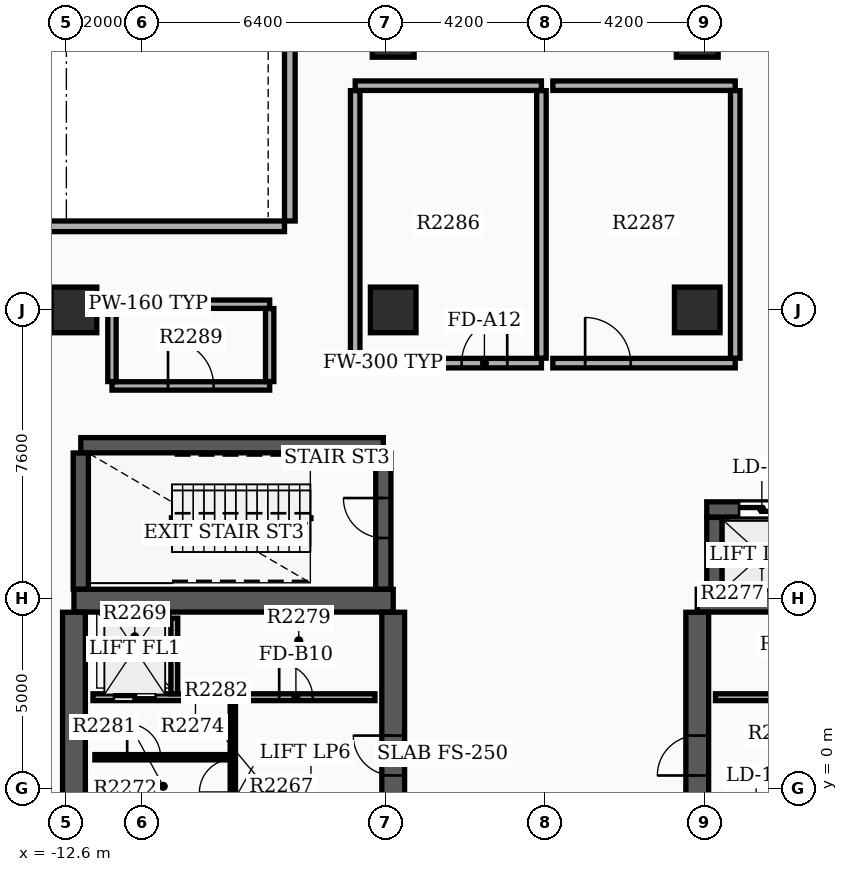
"""IFC4 building model, lengths in metres.
Left out: names, types, materials, properties, quantities, classifications, styles, units other than length and angle.
Written with IfcOpenShell. Run it as: python <this file> out.ifc"""

import sys

from ifc_helpers import new_model, si_unit, direction, frame, frame_2d, origin, origin_2d, place, context, subcontext, project, spatial, rectangle, extrude, element, fill, save


model = new_model("IFC4")
c1 = context("Model", 3, precision=1e-05, world=origin(), true_north=direction((0.0, 1.0)))
c2 = subcontext(c1, "Body", "Model", "MODEL_VIEW")
j1 = project(units=[si_unit("LENGTHUNIT", "METRE"), si_unit("PLANEANGLEUNIT", "RADIAN")], contexts=[c1])
p1 = place(None, origin())
s1 = spatial("IfcSite", under=j1, at=p1, CompositionType="ELEMENT")
p2 = place(p1, origin())
s2 = spatial("IfcBuilding", under=s1, at=p2, CompositionType="ELEMENT")
p3 = place(p2, frame((0.0, 0.0, 143.7)))
s3 = spatial("IfcBuildingStorey", under=s2, at=p3, CompositionType="ELEMENT", Elevation=143.7)
p4 = place(p3, frame((-12.4, 4.95, 0.0), z_axis=(0.0, 0.0, 1.0), x_axis=(1.0, 0.0, 0.0)))
e1 = element("IfcWall", 1, at=p4, inside=s3, PredefinedType="SHEAR", context=c2, shape_type="SweptSolid", body=[
    extrude(rectangle(XDim=8.4, YDim=0.6, at=frame_2d((4.2, 0.0))), origin(), (0.0, 0.0, 1.0), 4.9),
])
p5 = place(p3, frame((-12.4, -6.545, 0.0), z_axis=(0.0, 0.0, 1.0), x_axis=(0.0, 1.0, 0.0)))
e2 = element("IfcWall", 2, at=p5, inside=s3, PredefinedType="SHEAR", context=c2, shape_type="SweptSolid", body=[
    extrude(rectangle(XDim=11.19, YDim=0.6, at=frame_2d((5.595, 0.0))), origin(), (0.0, 0.0, 1.0), 4.9),
])
p6 = place(p3, frame((-4.0, -6.545, 0.0), z_axis=(0.0, 0.0, 1.0), x_axis=(0.0, 1.0, 0.0)))
e3 = element("IfcWall", 3, at=p6, inside=s3, PredefinedType="SHEAR", context=c2, shape_type="SweptSolid", body=[
    extrude(rectangle(XDim=11.19, YDim=0.6, at=frame_2d((5.595, 0.0))), origin(), (0.0, 0.0, 1.0), 4.9),
])
p7 = place(p6, frame((1.295, 0.0, 0.0)))
e4 = element("IfcOpeningElement", 4, at=p7, cuts=e3, PredefinedType="OPENING", context=c2, shape_type="SweptSolid", body=[
    extrude(rectangle(XDim=1.05, YDim=2.15, at=frame_2d((0.525, 1.075))), frame((0.0, 0.31, 0.0), z_axis=(0.0, -1.0, 0.0), x_axis=(1.0, 0.0, 0.0)), (0.0, 0.0, 1.0), 0.62),
])
p8 = place(p6, frame((6.895, 0.0, 0.0)))
e5 = element("IfcOpeningElement", 5, at=p8, cuts=e3, PredefinedType="OPENING", context=c2, shape_type="SweptSolid", body=[
    extrude(rectangle(XDim=1.05, YDim=2.15, at=frame_2d((0.525, 1.075))), frame((0.0, 0.31, 0.0), z_axis=(0.0, -1.0, 0.0), x_axis=(1.0, 0.0, 0.0)), (0.0, 0.0, 1.0), 0.62),
])
p9 = place(p3, frame((4.0, 4.95, 0.0), z_axis=(0.0, 0.0, 1.0), x_axis=(1.0, 0.0, 0.0)))
e6 = element("IfcWall", 6, at=p9, inside=s3, PredefinedType="SHEAR", context=c2, shape_type="SweptSolid", body=[
    extrude(rectangle(XDim=8.4, YDim=0.6, at=frame_2d((4.2, 0.0))), origin(), (0.0, 0.0, 1.0), 4.9),
])
p10 = place(p3, frame((4.0, -6.545, 0.0), z_axis=(0.0, 0.0, 1.0), x_axis=(0.0, 1.0, 0.0)))
e7 = element("IfcWall", 7, at=p10, inside=s3, PredefinedType="SHEAR", context=c2, shape_type="SweptSolid", body=[
    extrude(rectangle(XDim=11.19, YDim=0.6, at=frame_2d((5.595, 0.0))), origin(), (0.0, 0.0, 1.0), 4.9),
])
p11 = place(p10, frame((1.295, 0.0, 0.0)))
e8 = element("IfcOpeningElement", 8, at=p11, cuts=e7, PredefinedType="OPENING", context=c2, shape_type="SweptSolid", body=[
    extrude(rectangle(XDim=1.05, YDim=2.15, at=frame_2d((0.525, 1.075))), frame((0.0, 0.31, 0.0), z_axis=(0.0, -1.0, 0.0), x_axis=(1.0, 0.0, 0.0)), (0.0, 0.0, 1.0), 0.62),
])
p12 = place(p10, frame((6.895, 0.0, 0.0)))
e9 = element("IfcOpeningElement", 9, at=p12, cuts=e7, PredefinedType="OPENING", context=c2, shape_type="SweptSolid", body=[
    extrude(rectangle(XDim=1.05, YDim=2.15, at=frame_2d((0.525, 1.075))), frame((0.0, 0.31, 0.0), z_axis=(0.0, -1.0, 0.0), x_axis=(1.0, 0.0, 0.0)), (0.0, 0.0, 1.0), 0.62),
])
p13 = place(p3, frame((-12.22, 9.04, 0.0), z_axis=(0.0, 0.0, 1.0), x_axis=(1.0, 0.0, 0.0)))
e10 = element("IfcWall", 10, at=p13, inside=s3, PredefinedType="SHEAR", context=c2, shape_type="SweptSolid", body=[
    extrude(rectangle(XDim=7.96, YDim=0.4, at=frame_2d((3.98, 0.0))), origin(), (0.0, 0.0, 1.0), 4.9),
])
p14 = place(p3, frame((-12.22, 5.255, 0.0), z_axis=(0.0, 0.0, 1.0), x_axis=(0.0, 1.0, 0.0)))
e11 = element("IfcWall", 11, at=p14, inside=s3, PredefinedType="SHEAR", context=c2, shape_type="SweptSolid", body=[
    extrude(rectangle(XDim=3.58, YDim=0.4, at=frame_2d((1.79, 0.0))), origin(), (0.0, 0.0, 1.0), 4.9),
])
p15 = place(p3, frame((-4.26, 5.255, 0.0), z_axis=(0.0, 0.0, 1.0), x_axis=(0.0, 1.0, 0.0)))
e12 = element("IfcWall", 12, at=p15, inside=s3, PredefinedType="SHEAR", context=c2, shape_type="SweptSolid", body=[
    extrude(rectangle(XDim=3.58, YDim=0.4, at=frame_2d((1.79, 0.0))), origin(), (0.0, 0.0, 1.0), 4.9),
])
p16 = place(p15, frame((1.345, 0.0, 0.0)))
e13 = element("IfcOpeningElement", 13, at=p16, cuts=e12, PredefinedType="OPENING", context=c2, shape_type="SweptSolid", body=[
    extrude(rectangle(XDim=1.05, YDim=2.15, at=frame_2d((0.525, 1.075))), frame((0.0, 0.21, 0.0), z_axis=(0.0, -1.0, 0.0), x_axis=(1.0, 0.0, 0.0)), (0.0, 0.0, 1.0), 0.42),
])
p17 = place(p3, frame((4.45, 5.255, 0.0), z_axis=(0.0, 0.0, 1.0), x_axis=(0.0, 1.0, 0.0)))
e14 = element("IfcWall", 14, at=p17, inside=s3, PredefinedType="SHEAR", context=c2, shape_type="SweptSolid", body=[
    extrude(rectangle(XDim=1.885, YDim=0.4, at=frame_2d((0.942, 0.0))), origin(), (0.0, 0.0, 1.0), 4.9),
])
p18 = place(p3, frame((4.25, 7.35, 0.0), z_axis=(0.0, 0.0, 1.0), x_axis=(1.0, 0.0, 0.0)))
e15 = element("IfcWall", 15, at=p18, inside=s3, PredefinedType="SHEAR", context=c2, shape_type="SweptSolid", body=[
    extrude(rectangle(XDim=5.4, YDim=0.4, at=frame_2d((2.7, 0.0))), origin(), (0.0, 0.0, 1.0), 4.9),
])
p19 = place(p18, frame((0.85, 0.0, 0.0)))
e16 = element("IfcOpeningElement", 16, at=p19, cuts=e15, PredefinedType="OPENING", context=c2, shape_type="SweptSolid", body=[
    extrude(rectangle(XDim=1.2, YDim=2.2, at=frame_2d((0.6, 1.1))), frame((0.0, 0.21, 0.0), z_axis=(0.0, -1.0, 0.0), x_axis=(1.0, 0.0, 0.0)), (0.0, 0.0, 1.0), 0.42),
])
p20 = place(p18, frame((3.25, 0.0, 0.0)))
e17 = element("IfcOpeningElement", 17, at=p20, cuts=e15, PredefinedType="OPENING", context=c2, shape_type="SweptSolid", body=[
    extrude(rectangle(XDim=1.2, YDim=2.2, at=frame_2d((0.6, 1.1))), frame((0.0, 0.21, 0.0), z_axis=(0.0, -1.0, 0.0), x_axis=(1.0, 0.0, 0.0)), (0.0, 0.0, 1.0), 0.42),
])
for number, where, z_axis, x_axis in (
    (18, (-12.4, 12.6, 0.0), (0.0, 0.0, 1.0), (1.0, 0.0, 0.0)),
    (19, (4.0, 12.6, 0.0), (0.0, 0.0, 1.0), (1.0, 0.0, 0.0)),
    (20, (-4.0, 12.6, 0.0), (0.0, 0.0, 1.0), (1.0, 0.0, 0.0)),
):
    element("IfcColumn", number, at=place(p3, frame(where, z_axis=z_axis, x_axis=x_axis)), inside=s3, PredefinedType="COLUMN", context=c2, shape_type="SweptSolid", body=[
        extrude(rectangle(XDim=1.2, YDim=1.2, at=origin_2d()), origin(), (0.0, 0.0, 1.0), 5.1),
    ])
for number, where, z_axis, x_axis in (
    (21, (-4.0, 19.8, 0.0), (0.0, 0.0, 1.0), (1.0, 0.0, 0.0)),
    (22, (4.0, 19.8, 0.0), (0.0, 0.0, 1.0), (1.0, 0.0, 0.0)),
):
    element("IfcColumn", number, at=place(p3, frame(where, z_axis=z_axis, x_axis=x_axis)), inside=s3, PredefinedType="COLUMN", context=c2, shape_type="SweptSolid", body=[
        extrude(rectangle(XDim=1.1, YDim=1.1, at=origin_2d()), origin(), (0.0, 0.0, 1.0), 5.1),
    ])
p21 = place(p3, frame((-6.72, 35.04, 0.0), z_axis=(0.0, 0.0, 1.0), x_axis=(0.0, -1.0, 0.0)))
e23 = element("IfcWall", 23, at=p21, inside=s3, PredefinedType="STANDARD", context=c2, shape_type="SweptSolid", body=[
    extrude(rectangle(XDim=20.1, YDim=0.28, at=frame_2d((10.05, 0.0))), origin(), (0.0, 0.0, 1.0), 3.98),
])
p22 = place(p21, frame((0.85, 0.0, 0.95)))
e24 = element("IfcOpeningElement", 24, at=p22, cuts=e23, PredefinedType="OPENING", context=c2, shape_type="SweptSolid", body=[
    extrude(rectangle(XDim=1.1, YDim=1.2, at=frame_2d((0.55, 0.6))), frame((0.0, 0.15, 0.0), z_axis=(0.0, -1.0, 0.0), x_axis=(1.0, 0.0, 0.0)), (0.0, 0.0, 1.0), 0.3),
])
p23 = place(p3, frame((-13.16, 14.8, 0.0), z_axis=(0.0, 0.0, 1.0), x_axis=(1.0, 0.0, 0.0)))
e25 = element("IfcWall", 25, at=p23, inside=s3, PredefinedType="STANDARD", context=c2, shape_type="SweptSolid", body=[
    extrude(rectangle(XDim=6.3, YDim=0.28, at=frame_2d((3.15, 0.0))), origin(), (0.0, 0.0, 1.0), 3.98),
])
p24 = place(p3, frame((-11.9, 2.41, 0.0), z_axis=(0.0, 0.0, 1.0), x_axis=(1.0, 0.0, 0.0)))
e26 = element("IfcWall", 26, at=p24, inside=s3, PredefinedType="SOLIDWALL", context=c2, shape_type="SweptSolid", body=[
    extrude(rectangle(XDim=7.42, YDim=0.18, at=frame_2d((3.71, 0.0))), origin(), (0.0, 0.0, 1.0), 3.97),
])
p25 = place(p24, frame((0.55, 0.0, 0.0)))
e27 = element("IfcOpeningElement", 27, at=p25, cuts=e26, PredefinedType="OPENING", context=c2, shape_type="SweptSolid", body=[
    extrude(rectangle(XDim=1.1, YDim=2.15, at=frame_2d((0.55, 1.075))), frame((0.0, 0.1, 0.0), z_axis=(0.0, -1.0, 0.0), x_axis=(1.0, 0.0, 0.0)), (0.0, 0.0, 1.0), 0.2),
])
p26 = place(p24, frame((4.9, 0.0, 0.0)))
e28 = element("IfcOpeningElement", 28, at=p26, cuts=e26, PredefinedType="OPENING", context=c2, shape_type="SweptSolid", body=[
    extrude(rectangle(XDim=0.88, YDim=2.1, at=frame_2d((0.44, 1.05))), frame((0.0, 0.1, 0.0), z_axis=(0.0, -1.0, 0.0), x_axis=(1.0, 0.0, 0.0)), (0.0, 0.0, 1.0), 0.2),
])
p27 = place(p3, frame((4.48, 2.41, 0.0), z_axis=(0.0, 0.0, 1.0), x_axis=(1.0, 0.0, 0.0)))
e29 = element("IfcWall", 29, at=p27, inside=s3, PredefinedType="SOLIDWALL", context=c2, shape_type="SweptSolid", body=[
    extrude(rectangle(XDim=7.42, YDim=0.18, at=frame_2d((3.71, 0.0))), origin(), (0.0, 0.0, 1.0), 3.97),
])
p28 = place(p27, frame((5.67, 0.0, 0.0)))
e30 = element("IfcOpeningElement", 30, at=p28, cuts=e29, PredefinedType="OPENING", context=c2, shape_type="SweptSolid", body=[
    extrude(rectangle(XDim=1.1, YDim=2.15, at=frame_2d((0.55, 1.075))), frame((0.0, 0.1, 0.0), z_axis=(0.0, -1.0, 0.0), x_axis=(1.0, 0.0, 0.0)), (0.0, 0.0, 1.0), 0.2),
])
p29 = place(p27, frame((1.6, 0.0, 0.0)))
e31 = element("IfcOpeningElement", 31, at=p29, cuts=e29, PredefinedType="OPENING", context=c2, shape_type="SweptSolid", body=[
    extrude(rectangle(XDim=0.88, YDim=2.1, at=frame_2d((0.44, 1.05))), frame((0.0, 0.1, 0.0), z_axis=(0.0, -1.0, 0.0), x_axis=(1.0, 0.0, 0.0)), (0.0, 0.0, 1.0), 0.2),
])
p30 = place(p3, frame((-9.76, 2.5, 0.0), z_axis=(0.0, 0.0, 1.0), x_axis=(0.0, 1.0, 0.0)))
e32 = element("IfcWall", 32, at=p30, inside=s3, PredefinedType="SOLIDWALL", context=c2, shape_type="SweptSolid", body=[
    extrude(rectangle(XDim=1.99, YDim=0.18, at=frame_2d((0.995, 0.0))), origin(), (0.0, 0.0, 1.0), 3.97),
])
p31 = place(p3, frame((-8.22, -0.65, 0.0), z_axis=(0.0, 0.0, 1.0), x_axis=(0.0, 1.0, 0.0)))
e33 = element("IfcWall", 33, at=p31, inside=s3, PredefinedType="SOLIDWALL", context=c2, shape_type="SweptSolid", body=[
    extrude(rectangle(XDim=2.96, YDim=0.14, at=frame_2d((1.48, 0.0))), origin(), (0.0, 0.0, 1.0), 3.97),
])
p32 = place(p31, frame((0.55, 0.0, 0.0)))
e34 = element("IfcOpeningElement", 34, at=p32, cuts=e33, PredefinedType="OPENING", context=c2, shape_type="SweptSolid", body=[
    extrude(rectangle(XDim=0.88, YDim=2.1, at=frame_2d((0.44, 1.05))), frame((0.0, 0.08, 0.0), z_axis=(0.0, -1.0, 0.0), x_axis=(1.0, 0.0, 0.0)), (0.0, 0.0, 1.0), 0.16),
])
p33 = place(p3, frame((-11.85, 0.83, 0.0), z_axis=(0.0, 0.0, 1.0), x_axis=(1.0, 0.0, 0.0)))
e35 = element("IfcWall", 35, at=p33, inside=s3, PredefinedType="PARTITIONING", context=c2, shape_type="SweptSolid", body=[
    extrude(rectangle(XDim=3.552, YDim=0.14, at=frame_2d((1.776, 0.0))), origin(), (0.0, 0.0, 1.0), 3.97),
])
p34 = place(p33, frame((0.85, 0.0, 0.0)))
e36 = element("IfcOpeningElement", 36, at=p34, cuts=e35, PredefinedType="OPENING", context=c2, shape_type="SweptSolid", body=[
    extrude(rectangle(XDim=0.88, YDim=2.1, at=frame_2d((0.44, 1.05))), frame((0.0, 0.08, 0.0), z_axis=(0.0, -1.0, 0.0), x_axis=(1.0, 0.0, 0.0)), (0.0, 0.0, 1.0), 0.16),
])
p35 = place(p3, frame((-5.0, 11.2, 0.0), z_axis=(0.0, 0.0, 1.0), x_axis=(1.0, 0.0, 0.0)))
e37 = element("IfcWall", 37, at=p35, inside=s3, PredefinedType="SOLIDWALL", context=c2, shape_type="SweptSolid", body=[
    extrude(rectangle(XDim=4.9, YDim=0.25, at=frame_2d((2.45, 0.0))), origin(), (0.0, 0.0, 1.0), 3.97),
])
p36 = place(p35, frame((2.8, 0.0, 0.0)))
e38 = element("IfcOpeningElement", 38, at=p36, cuts=e37, PredefinedType="OPENING", context=c2, shape_type="SweptSolid", body=[
    extrude(rectangle(XDim=1.2, YDim=2.15, at=frame_2d((0.6, 1.075))), frame((0.0, 0.135, 0.0), z_axis=(0.0, -1.0, 0.0), x_axis=(1.0, 0.0, 0.0)), (0.0, 0.0, 1.0), 0.27),
])
p37 = place(p3, frame((-5.0, 18.5, 0.0), z_axis=(0.0, 0.0, 1.0), x_axis=(1.0, 0.0, 0.0)))
e39 = element("IfcWall", 39, at=p37, inside=s3, PredefinedType="SOLIDWALL", context=c2, shape_type="SweptSolid", body=[
    extrude(rectangle(XDim=4.9, YDim=0.25, at=frame_2d((2.45, 0.0))), origin(), (0.0, 0.0, 1.0), 3.97),
])
for number, where, z_axis, x_axis in (
    (40, (-5.0, 11.33, 0.0), (0.0, 0.0, 1.0), (0.0, 1.0, 0.0)),
    (41, (-0.1, 11.33, 0.0), (0.0, 0.0, 1.0), (0.0, 1.0, 0.0)),
):
    element("IfcWall", number, at=place(p3, frame(where, z_axis=z_axis, x_axis=x_axis)), inside=s3, PredefinedType="SOLIDWALL", context=c2, shape_type="SweptSolid", body=[
        extrude(rectangle(XDim=7.04, YDim=0.25, at=frame_2d((3.52, 0.0))), origin(), (0.0, 0.0, 1.0), 3.97),
    ])
p38 = place(p3, frame((0.2, 11.2, 0.0), z_axis=(0.0, 0.0, 1.0), x_axis=(1.0, 0.0, 0.0)))
e42 = element("IfcWall", 42, at=p38, inside=s3, PredefinedType="SOLIDWALL", context=c2, shape_type="SweptSolid", body=[
    extrude(rectangle(XDim=4.8, YDim=0.25, at=frame_2d((2.4, 0.0))), origin(), (0.0, 0.0, 1.0), 3.97),
])
p39 = place(p38, frame((0.85, 0.0, 0.0)))
e43 = element("IfcOpeningElement", 43, at=p39, cuts=e42, PredefinedType="OPENING", context=c2, shape_type="SweptSolid", body=[
    extrude(rectangle(XDim=1.2, YDim=2.15, at=frame_2d((0.6, 1.075))), frame((0.0, 0.135, 0.0), z_axis=(0.0, -1.0, 0.0), x_axis=(1.0, 0.0, 0.0)), (0.0, 0.0, 1.0), 0.27),
])
p40 = place(p3, frame((0.2, 18.5, 0.0), z_axis=(0.0, 0.0, 1.0), x_axis=(1.0, 0.0, 0.0)))
e44 = element("IfcWall", 44, at=p40, inside=s3, PredefinedType="SOLIDWALL", context=c2, shape_type="SweptSolid", body=[
    extrude(rectangle(XDim=4.8, YDim=0.25, at=frame_2d((2.4, 0.0))), origin(), (0.0, 0.0, 1.0), 3.97),
])
p41 = place(p3, frame((5.0, 11.33, 0.0), z_axis=(0.0, 0.0, 1.0), x_axis=(0.0, 1.0, 0.0)))
e45 = element("IfcWall", 45, at=p41, inside=s3, PredefinedType="SOLIDWALL", context=c2, shape_type="SweptSolid", body=[
    extrude(rectangle(XDim=7.04, YDim=0.25, at=frame_2d((3.52, 0.0))), origin(), (0.0, 0.0, 1.0), 3.97),
])
p42 = place(p3, frame((-11.4, 10.6, 0.0), z_axis=(0.0, 0.0, 1.0), x_axis=(1.0, 0.0, 0.0)))
e46 = element("IfcWall", 46, at=p42, inside=s3, PredefinedType="PARTITIONING", context=c2, shape_type="SweptSolid", body=[
    extrude(rectangle(XDim=4.15, YDim=0.22, at=frame_2d((2.075, 0.0))), origin(), (0.0, 0.0, 1.0), 3.97),
])
p43 = place(p42, frame((1.475, 0.0, 0.0)))
e47 = element("IfcOpeningElement", 47, at=p43, cuts=e46, PredefinedType="OPENING", context=c2, shape_type="SweptSolid", body=[
    extrude(rectangle(XDim=1.2, YDim=2.15, at=frame_2d((0.6, 1.075))), frame((0.0, 0.12, 0.0), z_axis=(0.0, -1.0, 0.0), x_axis=(1.0, 0.0, 0.0)), (0.0, 0.0, 1.0), 0.24),
])
p44 = place(p3, frame((-11.4, 12.75, 0.0), z_axis=(0.0, 0.0, 1.0), x_axis=(1.0, 0.0, 0.0)))
e48 = element("IfcWall", 48, at=p44, inside=s3, PredefinedType="PARTITIONING", context=c2, shape_type="SweptSolid", body=[
    extrude(rectangle(XDim=4.15, YDim=0.22, at=frame_2d((2.075, 0.0))), origin(), (0.0, 0.0, 1.0), 3.97),
])
for number, where, z_axis, x_axis in (
    (49, (-11.4, 10.715, 0.0), (0.0, 0.0, 1.0), (0.0, 1.0, 0.0)),
    (50, (-7.25, 10.715, 0.0), (0.0, 0.0, 1.0), (0.0, 1.0, 0.0)),
):
    element("IfcWall", number, at=place(p3, frame(where, z_axis=z_axis, x_axis=x_axis)), inside=s3, PredefinedType="PARTITIONING", context=c2, shape_type="SweptSolid", body=[
        extrude(rectangle(XDim=1.92, YDim=0.22, at=frame_2d((0.96, 0.0))), origin(), (0.0, 0.0, 1.0), 3.97),
    ])
p45 = place(p8, origin())
e51 = element("IfcDoor", 51, at=p45, inside=s3, OperationType="SINGLE_SWING_RIGHT", PredefinedType="DOOR", context=c2, shape_type="SweptSolid", body=[
    extrude(rectangle(XDim=1.05, YDim=2.15, at=frame_2d((0.525, 1.075))), frame((0.0, 0.025, 0.0), z_axis=(0.0, -1.0, 0.0), x_axis=(1.0, 0.0, 0.0)), (0.0, 0.0, 1.0), 0.05),
])
fill(e5, e51)
p46 = place(p12, origin())
e52 = element("IfcDoor", 52, at=p46, inside=s3, OperationType="SINGLE_SWING_LEFT", PredefinedType="DOOR", context=c2, shape_type="SweptSolid", body=[
    extrude(rectangle(XDim=1.05, YDim=2.15, at=frame_2d((0.525, 1.075))), frame((0.0, 0.025, 0.0), z_axis=(0.0, -1.0, 0.0), x_axis=(1.0, 0.0, 0.0)), (0.0, 0.0, 1.0), 0.05),
])
fill(e9, e52)
p47 = place(p16, origin())
e53 = element("IfcDoor", 53, at=p47, inside=s3, OperationType="SINGLE_SWING_RIGHT", PredefinedType="DOOR", context=c2, shape_type="SweptSolid", body=[
    extrude(rectangle(XDim=1.05, YDim=2.15, at=frame_2d((0.525, 1.075))), frame((0.0, 0.025, 0.0), z_axis=(0.0, -1.0, 0.0), x_axis=(1.0, 0.0, 0.0)), (0.0, 0.0, 1.0), 0.05),
])
fill(e13, e53)
p48 = place(p25, origin())
e54 = element("IfcDoor", 54, at=p48, inside=s3, OperationType="DOUBLE_DOOR_SLIDING", PredefinedType="DOOR", context=c2, shape_type="SweptSolid", body=[
    extrude(rectangle(XDim=1.1, YDim=2.15, at=frame_2d((0.55, 1.075))), frame((0.0, 0.025, 0.0), z_axis=(0.0, -1.0, 0.0), x_axis=(1.0, 0.0, 0.0)), (0.0, 0.0, 1.0), 0.05),
])
fill(e27, e54)
p49 = place(p19, origin())
e55 = element("IfcDoor", 55, at=p49, inside=s3, OperationType="DOUBLE_DOOR_SLIDING", PredefinedType="DOOR", context=c2, shape_type="SweptSolid", body=[
    extrude(rectangle(XDim=1.2, YDim=2.2, at=frame_2d((0.6, 1.1))), frame((0.0, 0.025, 0.0), z_axis=(0.0, -1.0, 0.0), x_axis=(1.0, 0.0, 0.0)), (0.0, 0.0, 1.0), 0.05),
])
fill(e16, e55)
p50 = place(p26, origin())
e56 = element("IfcDoor", 56, at=p50, inside=s3, OperationType="SINGLE_SWING_LEFT", PredefinedType="DOOR", context=c2, shape_type="SweptSolid", body=[
    extrude(rectangle(XDim=0.88, YDim=2.1, at=frame_2d((0.44, 1.05))), frame((0.0, 0.025, 0.0), z_axis=(0.0, -1.0, 0.0), x_axis=(1.0, 0.0, 0.0)), (0.0, 0.0, 1.0), 0.05),
])
fill(e28, e56)
p51 = place(p32, origin())
e57 = element("IfcDoor", 57, at=p51, inside=s3, OperationType="SINGLE_SWING_LEFT", PredefinedType="DOOR", context=c2, shape_type="SweptSolid", body=[
    extrude(rectangle(XDim=0.88, YDim=2.1, at=frame_2d((0.44, 1.05))), frame((0.0, 0.025, 0.0), z_axis=(0.0, -1.0, 0.0), x_axis=(1.0, 0.0, 0.0)), (0.0, 0.0, 1.0), 0.05),
])
fill(e34, e57)
p52 = place(p34, origin())
e58 = element("IfcDoor", 58, at=p52, inside=s3, OperationType="SINGLE_SWING_LEFT", PredefinedType="DOOR", context=c2, shape_type="SweptSolid", body=[
    extrude(rectangle(XDim=0.88, YDim=2.1, at=frame_2d((0.44, 1.05))), frame((0.0, 0.025, 0.0), z_axis=(0.0, -1.0, 0.0), x_axis=(1.0, 0.0, 0.0)), (0.0, 0.0, 1.0), 0.05),
])
fill(e36, e58)
p53 = place(p36, origin())
e59 = element("IfcDoor", 59, at=p53, inside=s3, OperationType="SINGLE_SWING_RIGHT", PredefinedType="DOOR", context=c2, shape_type="SweptSolid", body=[
    extrude(rectangle(XDim=1.2, YDim=2.15, at=frame_2d((0.6, 1.075))), frame((0.0, 0.025, 0.0), z_axis=(0.0, -1.0, 0.0), x_axis=(1.0, 0.0, 0.0)), (0.0, 0.0, 1.0), 0.05),
])
fill(e38, e59)
p54 = place(p39, origin())
e60 = element("IfcDoor", 60, at=p54, inside=s3, OperationType="SINGLE_SWING_LEFT", PredefinedType="DOOR", context=c2, shape_type="SweptSolid", body=[
    extrude(rectangle(XDim=1.2, YDim=2.15, at=frame_2d((0.6, 1.075))), frame((0.0, 0.025, 0.0), z_axis=(0.0, -1.0, 0.0), x_axis=(1.0, 0.0, 0.0)), (0.0, 0.0, 1.0), 0.05),
])
fill(e43, e60)
p55 = place(p43, origin())
e61 = element("IfcDoor", 61, at=p55, inside=s3, OperationType="SINGLE_SWING_LEFT", PredefinedType="DOOR", context=c2, shape_type="SweptSolid", body=[
    extrude(rectangle(XDim=1.2, YDim=2.15, at=frame_2d((0.6, 1.075))), frame((0.0, 0.025, 0.0), z_axis=(0.0, -1.0, 0.0), x_axis=(1.0, 0.0, 0.0)), (0.0, 0.0, 1.0), 0.05),
])
fill(e47, e61)
save(model, sys.argv[1])
